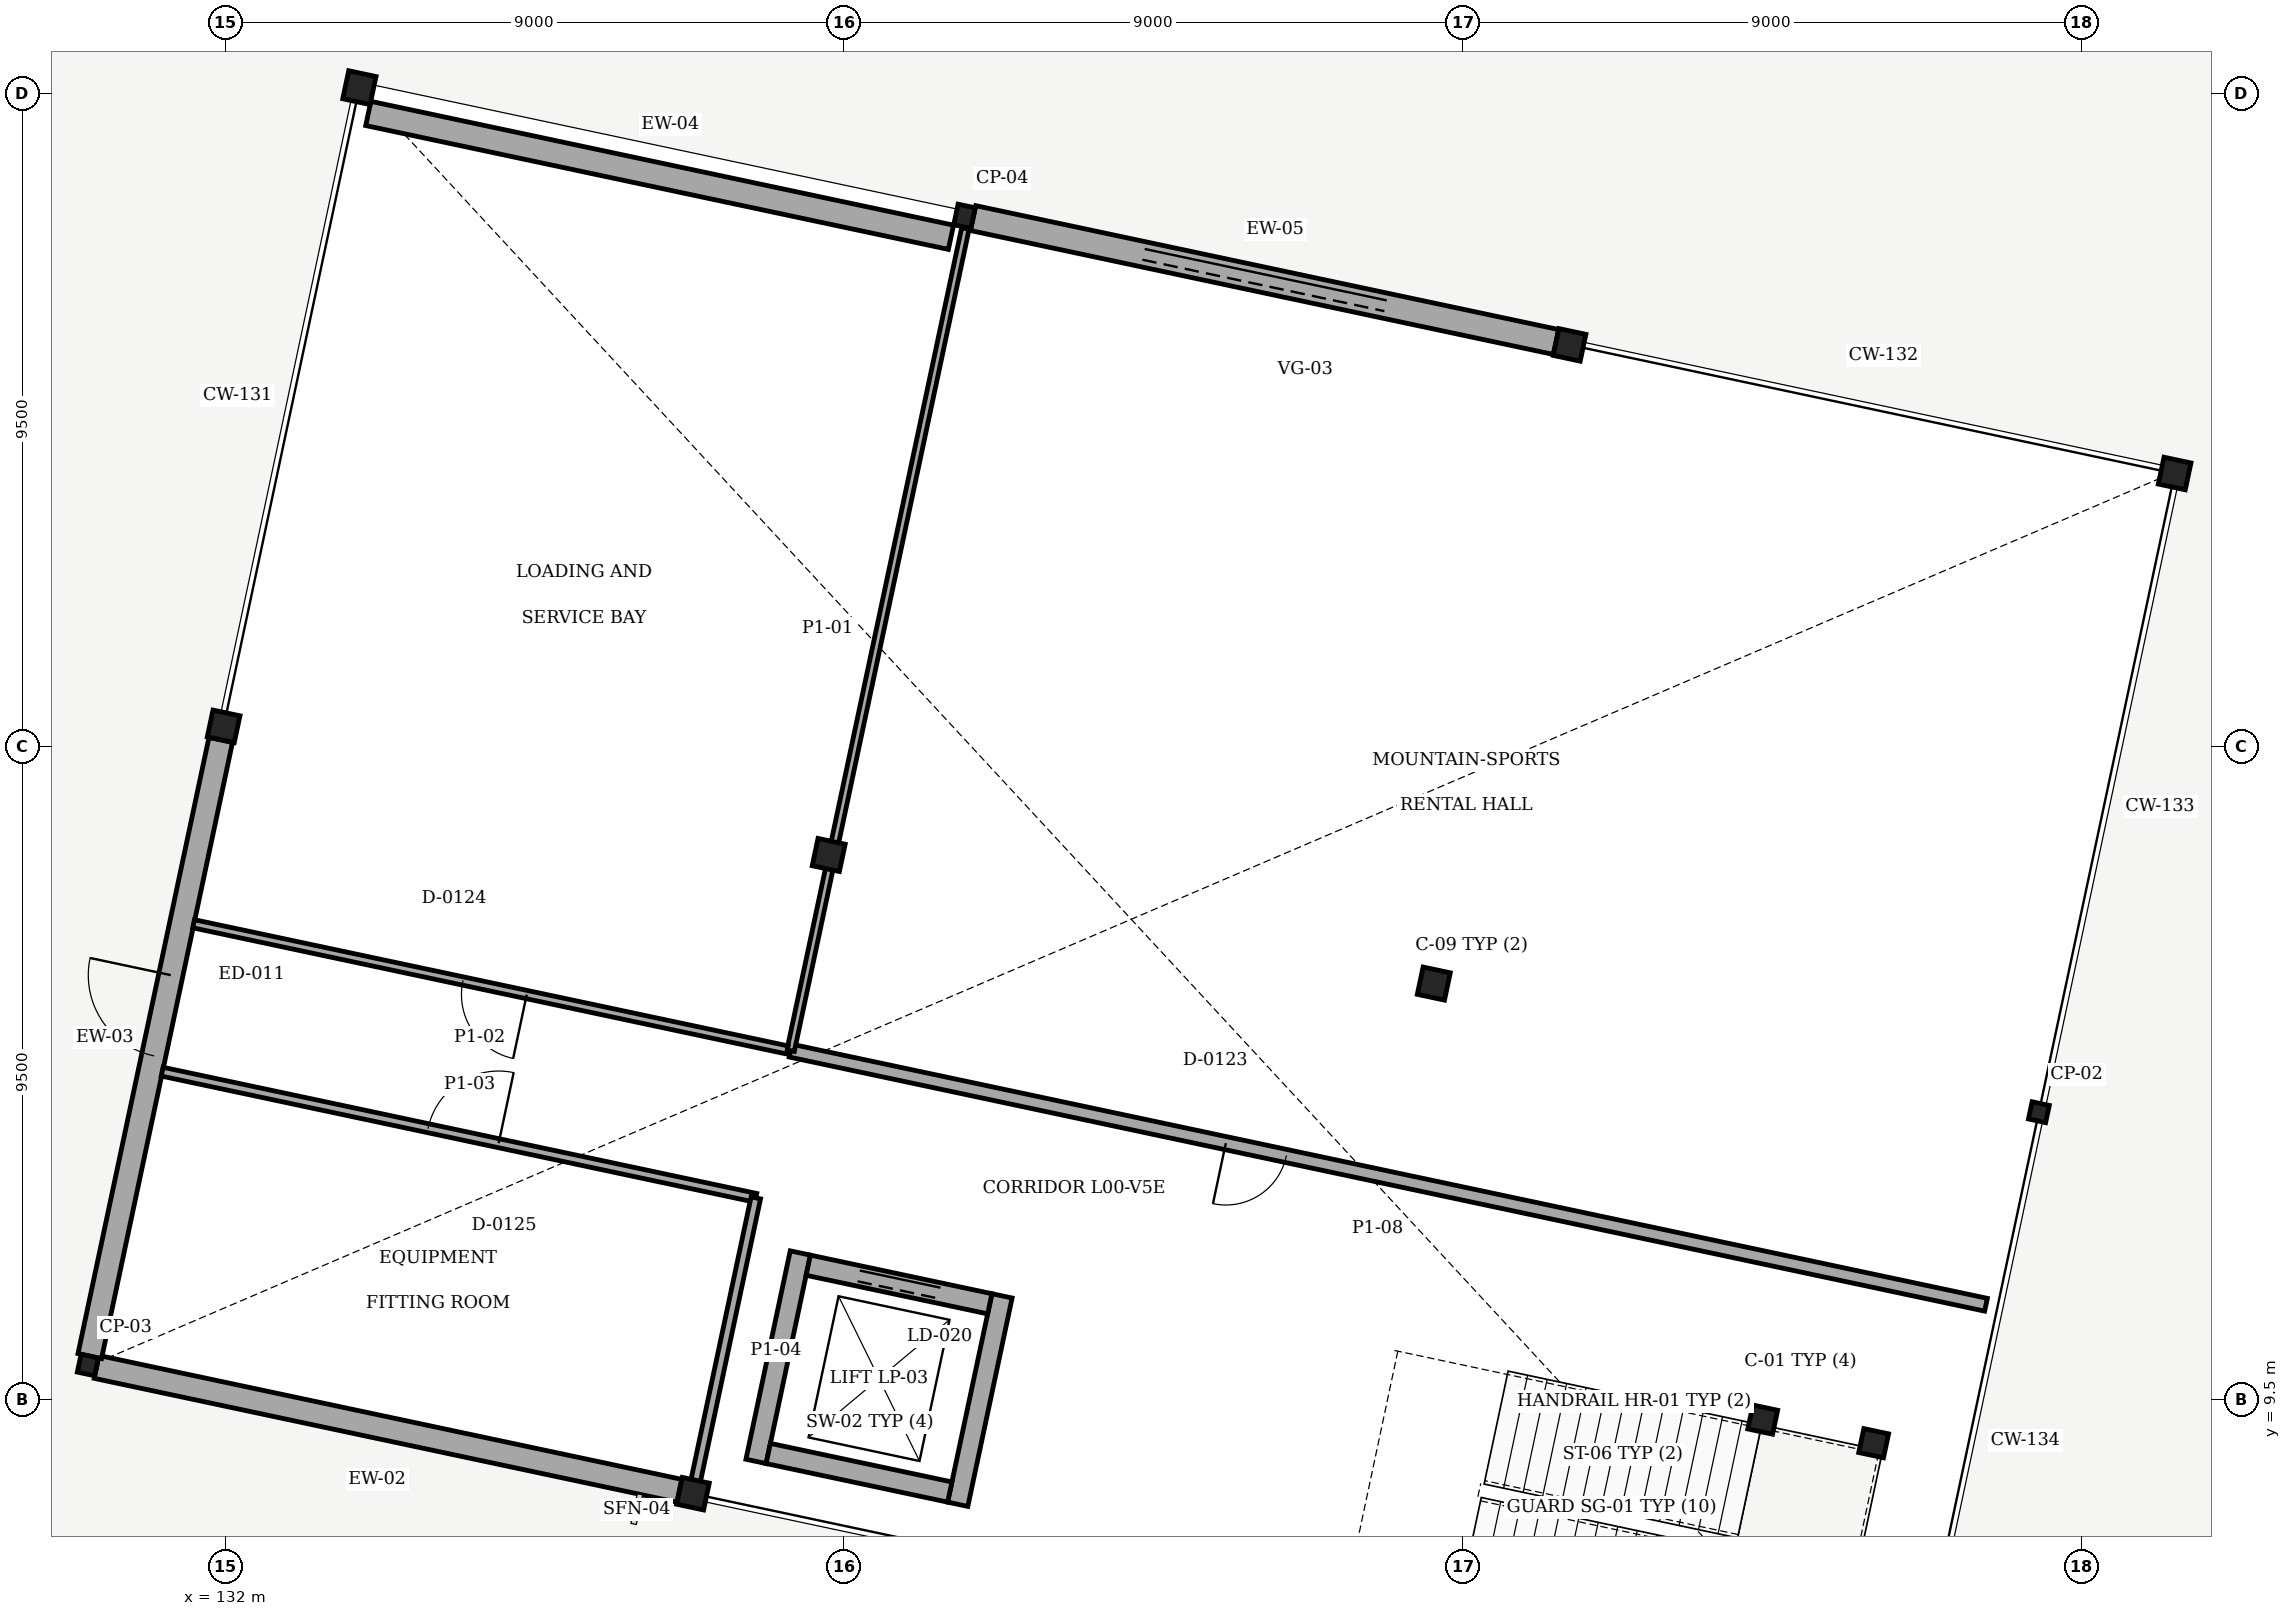
"""IFC4 building model, lengths in metres.
Left out: names, types, materials, properties, quantities, classifications, styles, units other than length and angle.
Written with IfcOpenShell. Run it as: python <this file> out.ifc"""

import sys

from ifc_helpers import new_model, si_unit, direction, frame, frame_2d, origin, origin_with_axes, origin_2d, place, context, subcontext, project, spatial, rectangle, i_section, extrude, element, fill, save


model = new_model("IFC4")
c1 = context("Model", 3, precision=1e-05, world=origin(), true_north=direction((0.0, 1.0)))
c2 = subcontext(c1, "Body", "Model", "MODEL_VIEW")
j1 = project(units=[si_unit("LENGTHUNIT", "METRE"), si_unit("PLANEANGLEUNIT", "RADIAN")], contexts=[c1])
p1 = place(None, origin())
s1 = spatial("IfcSite", under=j1, at=p1, CompositionType="ELEMENT")
p2 = place(p1, origin())
s2 = spatial("IfcBuilding", under=s1, at=p2, CompositionType="ELEMENT")
p3 = place(p2, origin())
s3 = spatial("IfcBuildingStorey", under=s2, at=p3, CompositionType="ELEMENT", Elevation=0.0)
p4 = place(p3, frame((130.0, 10.0, 0.0), z_axis=(0.0, 0.0, 1.0), x_axis=(0.978147600734, -0.207911690818, 0.0)))
e1 = element("IfcColumn", 1, at=p4, inside=s3, PredefinedType="PILASTER", context=c2, shape_type="SweptSolid", body=[
    extrude(i_section(OverallWidth=0.257, OverallDepth=0.264, WebThickness=0.012, FlangeThickness=0.02, FilletRadius=0.009, at=origin_2d()), origin(), (0.0, 0.0, 1.0), 4.8),
])
p5 = place(p3, frame((131.975, 19.292, 0.0), z_axis=(0.0, 0.0, 1.0), x_axis=(0.978147600734, -0.207911690818, 0.0)))
e2 = element("IfcColumn", 2, at=p5, inside=s3, PredefinedType="COLUMN", context=c2, shape_type="SweptSolid", body=[
    extrude(i_section(OverallWidth=0.401, OverallDepth=0.399, WebThickness=0.025, FlangeThickness=0.04, FilletRadius=0.015, at=origin_2d()), origin(), (0.0, 0.0, 1.0), 4.8),
])
p6 = place(p3, frame((133.95, 28.585, 0.0), z_axis=(0.0, 0.0, 1.0), x_axis=(0.978147600734, -0.207911690818, 0.0)))
e3 = element("IfcColumn", 3, at=p6, inside=s3, PredefinedType="COLUMN", context=c2, shape_type="SweptSolid", body=[
    extrude(i_section(OverallWidth=0.406, OverallDepth=0.417, WebThickness=0.03, FlangeThickness=0.048, FilletRadius=0.015, at=origin_2d()), origin(), (0.0, 0.0, 1.0), 4.8),
])
p7 = place(p3, frame((138.803, 8.129, 0.0), z_axis=(0.0, 0.0, 1.0), x_axis=(0.978147600734, -0.207911690818, 0.0)))
e4 = element("IfcColumn", 4, at=p7, inside=s3, PredefinedType="COLUMN", context=c2, shape_type="SweptSolid", body=[
    extrude(i_section(OverallWidth=0.401, OverallDepth=0.399, WebThickness=0.025, FlangeThickness=0.04, FilletRadius=0.015, at=origin_2d()), origin(), (0.0, 0.0, 1.0), 4.8),
])
p8 = place(p3, frame((140.779, 17.421, 0.0), z_axis=(0.0, 0.0, 1.0), x_axis=(0.978147600734, -0.207911690818, 0.0)))
e5 = element("IfcColumn", 5, at=p8, inside=s3, PredefinedType="COLUMN", context=c2, shape_type="SweptSolid", body=[
    extrude(i_section(OverallWidth=0.404, OverallDepth=0.406, WebThickness=0.027, FlangeThickness=0.044, FilletRadius=0.015, at=origin_2d()), origin(), (0.0, 0.0, 1.0), 4.8),
])
p9 = place(p3, frame((142.754, 26.714, 0.0), z_axis=(0.0, 0.0, 1.0), x_axis=(0.978147600734, -0.207911690818, 0.0)))
e6 = element("IfcColumn", 6, at=p9, inside=s3, PredefinedType="PILASTER", context=c2, shape_type="SweptSolid", body=[
    extrude(i_section(OverallWidth=0.254, OverallDepth=0.306, WebThickness=0.009, FlangeThickness=0.015, FilletRadius=0.011, at=origin_2d()), origin(), (0.0, 0.0, 1.0), 4.8),
])
p10 = place(p3, frame((149.582, 15.55, 0.0), z_axis=(0.0, 0.0, 1.0), x_axis=(0.978147600734, -0.207911690818, 0.0)))
e7 = element("IfcColumn", 7, at=p10, inside=s3, PredefinedType="COLUMN", context=c2, shape_type="SweptSolid", body=[
    extrude(i_section(OverallWidth=0.404, OverallDepth=0.406, WebThickness=0.027, FlangeThickness=0.044, FilletRadius=0.015, at=origin_2d()), origin(), (0.0, 0.0, 1.0), 4.8),
])
p11 = place(p3, frame((151.557, 24.842, 0.0), z_axis=(0.0, 0.0, 1.0), x_axis=(0.978147600734, -0.207911690818, 0.0)))
e8 = element("IfcColumn", 8, at=p11, inside=s3, PredefinedType="COLUMN", context=c2, shape_type="SweptSolid", body=[
    extrude(i_section(OverallWidth=0.401, OverallDepth=0.399, WebThickness=0.025, FlangeThickness=0.04, FilletRadius=0.015, at=origin_2d()), origin(), (0.0, 0.0, 1.0), 4.8),
])
p12 = place(p3, frame((158.385, 13.679, 0.0), z_axis=(0.0, 0.0, 1.0), x_axis=(0.978147600734, -0.207911690818, 0.0)))
e9 = element("IfcColumn", 9, at=p12, inside=s3, PredefinedType="PILASTER", context=c2, shape_type="SweptSolid", body=[
    extrude(i_section(OverallWidth=0.255, OverallDepth=0.256, WebThickness=0.01, FlangeThickness=0.016, FilletRadius=0.009, at=origin_2d()), origin(), (0.0, 0.0, 1.0), 4.8),
])
p13 = place(p3, frame((160.36, 22.971, 0.0), z_axis=(0.0, 0.0, 1.0), x_axis=(0.978147600734, -0.207911690818, 0.0)))
e10 = element("IfcColumn", 10, at=p13, inside=s3, PredefinedType="COLUMN", context=c2, shape_type="SweptSolid", body=[
    extrude(i_section(OverallWidth=0.401, OverallDepth=0.399, WebThickness=0.025, FlangeThickness=0.04, FilletRadius=0.015, at=origin_2d()), origin(), (0.0, 0.0, 1.0), 4.8),
])
p14 = place(p3, frame((138.605, 8.171, 0.0), z_axis=(0.0, 0.0, 1.0), x_axis=(-0.978146535451, 0.207916702516, 0.0)))
e11 = element("IfcWall", 11, at=p14, inside=s3, PredefinedType="SOLIDWALL", context=c2, shape_type="SweptSolid", body=[
    extrude(rectangle(XDim=8.667, YDim=0.34, at=frame_2d((4.333, 0.0))), origin(), (0.0, 0.0, 1.0), 3.4),
])
p15 = place(p3, frame((130.028, 10.131, 0.0), z_axis=(0.0, 0.0, 1.0), x_axis=(0.207925982851, 0.978144562759, 0.0)))
e12 = element("IfcWall", 12, at=p15, inside=s3, PredefinedType="SOLIDWALL", context=c2, shape_type="SweptSolid", body=[
    extrude(rectangle(XDim=9.164, YDim=0.35, at=frame_2d((4.582, 0.0))), origin(), (0.0, 0.0, 1.0), 3.4),
])
p16 = place(p15, frame((4.466, 0.0, 0.0)))
e13 = element("IfcOpeningElement", 13, at=p16, cuts=e12, PredefinedType="OPENING", context=c2, shape_type="SweptSolid", body=[
    extrude(rectangle(XDim=1.2, YDim=2.2, at=frame_2d((0.6, 1.1))), frame((0.0, 0.185, 0.0), z_axis=(0.0, -1.0, 0.0), x_axis=(1.0, 0.0, 0.0)), (0.0, 0.0, 1.0), 0.37),
])
p17 = place(p3, frame((134.08, 28.21, 0.0), z_axis=(0.0, 0.0, 1.0), x_axis=(0.97814861123, -0.207906936749, 0.0)))
e14 = element("IfcWall", 14, at=p17, inside=s3, PredefinedType="SOLIDWALL", context=c2, shape_type="SweptSolid", body=[
    extrude(rectangle(XDim=8.666, YDim=0.36, at=frame_2d((4.333, 0.0))), origin(), (0.0, 0.0, 1.0), 3.4),
])
p18 = place(p3, frame((142.88, 26.687, 0.0), z_axis=(0.0, 0.0, 1.0), x_axis=(0.978148112715, -0.207909282121, 0.0)))
e15 = element("IfcWall", 15, at=p18, inside=s3, PredefinedType="SOLIDWALL", context=c2, shape_type="SweptSolid", body=[
    extrude(rectangle(XDim=8.668, YDim=0.37, at=frame_2d((4.334, 0.0))), origin(), (0.0, 0.0, 1.0), 3.4),
])
p19 = place(p18, frame((2.534, 0.0, 0.0)))
e16 = element("IfcOpeningElement", 16, at=p19, cuts=e15, PredefinedType="OPENING", context=c2, shape_type="SweptSolid", body=[
    extrude(rectangle(XDim=3.6, YDim=3.05, at=frame_2d((1.8, 1.525))), frame((0.0, 0.195, 0.0), z_axis=(0.0, -1.0, 0.0), x_axis=(1.0, 0.0, 0.0)), (0.0, 0.0, 1.0), 0.39),
])
for number, where, z_axis, x_axis in (
    (17, (154.367, 9.206, 0.0), (0.0, 0.0, 1.0), (0.978, -0.208, 0.0)),
    (18, (155.981, 8.863, 0.0), (0.0, 0.0, 1.0), (0.978, -0.208, 0.0)),
):
    element("IfcColumn", number, at=place(p3, frame(where, z_axis=z_axis, x_axis=x_axis)), inside=s3, PredefinedType="COLUMN", context=c2, shape_type="SweptSolid", body=[
        extrude(i_section(OverallWidth=0.368, OverallDepth=0.356, WebThickness=0.011, FlangeThickness=0.018, FilletRadius=0.015, at=origin_2d()), origin(), (0.0, 0.0, 1.0), 2.2),
    ])
p20 = place(p3, frame((139.721, 8.598, 0.0), z_axis=(0.0, 0.0, 1.0), x_axis=(0.207899254824, 0.978150244003, 0.0)))
e19 = element("IfcWall", 19, at=p20, inside=s3, PredefinedType="SHEAR", context=c2, shape_type="SweptSolid", body=[
    extrude(rectangle(XDim=3.1, YDim=0.3, at=frame_2d((1.55, 0.0))), origin(), (0.0, 0.0, 1.0), 4.54),
])
p21 = place(p3, frame((142.656, 7.975, 0.0), z_axis=(0.0, 0.0, 1.0), x_axis=(0.207915270313, 0.978146839882, 0.0)))
e20 = element("IfcWall", 20, at=p21, inside=s3, PredefinedType="SHEAR", context=c2, shape_type="SweptSolid", body=[
    extrude(rectangle(XDim=3.1, YDim=0.3, at=frame_2d((1.55, 0.0))), origin(), (0.0, 0.0, 1.0), 4.54),
])
p22 = place(p3, frame((139.899, 8.714, 0.0), z_axis=(0.0, 0.0, 1.0), x_axis=(0.978133334052, -0.207978798957, 0.0)))
e21 = element("IfcWall", 21, at=p22, inside=s3, PredefinedType="SHEAR", context=c2, shape_type="SweptSolid", body=[
    extrude(rectangle(XDim=2.7, YDim=0.3, at=frame_2d((1.35, 0.0))), origin(), (0.0, 0.0, 1.0), 4.54),
])
p23 = place(p3, frame((140.481, 11.453, 0.0), z_axis=(0.0, 0.0, 1.0), x_axis=(0.97815563361, -0.207873895514, 0.0)))
e22 = element("IfcWall", 22, at=p23, inside=s3, PredefinedType="SHEAR", context=c2, shape_type="SweptSolid", body=[
    extrude(rectangle(XDim=2.7, YDim=0.3, at=frame_2d((1.35, 0.0))), origin(), (0.0, 0.0, 1.0), 4.54),
])
p24 = place(p23, frame((0.75, 0.0, 0.0)))
e23 = element("IfcOpeningElement", 23, at=p24, cuts=e22, PredefinedType="OPENING", context=c2, shape_type="SweptSolid", body=[
    extrude(rectangle(XDim=1.2, YDim=2.15, at=frame_2d((0.6, 1.075))), frame((0.0, 0.16, 0.0), z_axis=(0.0, -1.0, 0.0), x_axis=(1.0, 0.0, 0.0)), (0.0, 0.0, 1.0), 0.32),
])
p25 = place(p3, frame((157.616, 10.877, 0.0), z_axis=(0.0, 0.0, 1.0), x_axis=(-0.978146704978, 0.207915904975, 0.0)))
e24 = element("IfcWall", 24, at=p25, inside=s3, PredefinedType="PARTITIONING", context=c2, shape_type="SweptSolid", body=[
    extrude(rectangle(XDim=17.78, YDim=0.19, at=frame_2d((8.89, 0.0))), origin(), (0.0, 0.0, 1.0), 3.38),
])
p26 = place(p25, frame((10.407, 0.0, 0.0)))
e25 = element("IfcOpeningElement", 25, at=p26, cuts=e24, PredefinedType="OPENING", context=c2, shape_type="SweptSolid", body=[
    extrude(rectangle(XDim=0.9, YDim=2.1, at=frame_2d((0.45, 1.05))), frame((0.0, 0.105, 0.0), z_axis=(0.0, -1.0, 0.0), x_axis=(1.0, 0.0, 0.0)), (0.0, 0.0, 1.0), 0.21),
])
p27 = place(p3, frame((140.224, 14.574, 0.0), z_axis=(0.0, 0.0, 1.0), x_axis=(0.207929664169, 0.978143780207, 0.0)))
e26 = element("IfcWall", 26, at=p27, inside=s3, PredefinedType="PARTITIONING", context=c2, shape_type="SweptSolid", body=[
    extrude(rectangle(XDim=12.23, YDim=0.11, at=frame_2d((6.115, 0.0))), origin(), (0.0, 0.0, 1.0), 3.38),
])
p28 = place(p3, frame((140.176, 14.584, 0.0), z_axis=(0.0, 0.0, 1.0), x_axis=(-0.978145427303, 0.207921915745, 0.0)))
e27 = element("IfcWall", 27, at=p28, inside=s3, PredefinedType="PARTITIONING", context=c2, shape_type="SweptSolid", body=[
    extrude(rectangle(XDim=8.83, YDim=0.12, at=frame_2d((4.415, 0.0))), origin(), (0.0, 0.0, 1.0), 3.38),
])
p29 = place(p28, frame((3.875, 0.0, 0.0)))
e28 = element("IfcOpeningElement", 28, at=p29, cuts=e27, PredefinedType="OPENING", context=c2, shape_type="SweptSolid", body=[
    extrude(rectangle(XDim=0.95, YDim=2.15, at=frame_2d((0.475, 1.075))), frame((0.0, 0.07, 0.0), z_axis=(0.0, -1.0, 0.0), x_axis=(1.0, 0.0, 0.0)), (0.0, 0.0, 1.0), 0.14),
])
p30 = place(p3, frame((131.081, 14.269, 0.0), z_axis=(0.0, 0.0, 1.0), x_axis=(0.978146622571, -0.20791629266, 0.0)))
e29 = element("IfcWall", 29, at=p30, inside=s3, PredefinedType="PARTITIONING", context=c2, shape_type="SweptSolid", body=[
    extrude(rectangle(XDim=8.83, YDim=0.13, at=frame_2d((4.415, 0.0))), origin(), (0.0, 0.0, 1.0), 3.38),
])
p31 = place(p30, frame((3.955, 0.0, 0.0)))
e30 = element("IfcOpeningElement", 30, at=p31, cuts=e29, PredefinedType="OPENING", context=c2, shape_type="SweptSolid", body=[
    extrude(rectangle(XDim=1.05, YDim=2.2, at=frame_2d((0.525, 1.1))), frame((0.0, 0.075, 0.0), z_axis=(0.0, -1.0, 0.0), x_axis=(1.0, 0.0, 0.0)), (0.0, 0.0, 1.0), 0.15),
])
p32 = place(p3, frame((139.718, 12.433, 0.0), z_axis=(0.0, 0.0, 1.0), x_axis=(-0.207956086708, -0.978138163043, 0.0)))
e31 = element("IfcWall", 31, at=p32, inside=s3, PredefinedType="PARTITIONING", context=c2, shape_type="SweptSolid", body=[
    extrude(rectangle(XDim=4.23, YDim=0.14, at=frame_2d((2.115, 0.0))), origin(), (0.0, 0.0, 1.0), 3.38),
])
p33 = place(p16, origin_with_axes())
e32 = element("IfcDoor", 32, at=p33, inside=s3, OperationType="SINGLE_SWING_RIGHT", PredefinedType="DOOR", context=c2, shape_type="SweptSolid", body=[
    extrude(rectangle(XDim=1.2, YDim=2.2, at=frame_2d((0.6, 1.1))), frame((0.0, 0.025, 0.0), z_axis=(0.0, -1.0, 0.0), x_axis=(1.0, 0.0, 0.0)), (0.0, 0.0, 1.0), 0.05),
])
fill(e13, e32)
p34 = place(p19, origin_with_axes())
e33 = element("IfcDoor", 33, at=p34, inside=s3, OperationType="ROLLINGUP", PredefinedType="GATE", context=c2, shape_type="SweptSolid", body=[
    extrude(rectangle(XDim=3.6, YDim=3.05, at=frame_2d((1.8, 1.525))), frame((0.0, 0.025, 0.0), z_axis=(0.0, -1.0, 0.0), x_axis=(1.0, 0.0, 0.0)), (0.0, 0.0, 1.0), 0.05),
])
fill(e16, e33)
p35 = place(p24, origin_with_axes())
e34 = element("IfcDoor", 34, at=p35, inside=s3, OperationType="DOUBLE_DOOR_SLIDING", PredefinedType="DOOR", context=c2, shape_type="SweptSolid", body=[
    extrude(rectangle(XDim=1.2, YDim=2.15, at=frame_2d((0.6, 1.075))), frame((0.0, 0.025, 0.0), z_axis=(0.0, -1.0, 0.0), x_axis=(1.0, 0.0, 0.0)), (0.0, 0.0, 1.0), 0.05),
])
fill(e23, e34)
p36 = place(p26, origin_with_axes())
e35 = element("IfcDoor", 35, at=p36, inside=s3, OperationType="SINGLE_SWING_RIGHT", PredefinedType="DOOR", context=c2, shape_type="SweptSolid", body=[
    extrude(rectangle(XDim=0.9, YDim=2.1, at=frame_2d((0.45, 1.05))), frame((0.0, 0.025, 0.0), z_axis=(0.0, -1.0, 0.0), x_axis=(1.0, 0.0, 0.0)), (0.0, 0.0, 1.0), 0.05),
])
fill(e25, e35)
p37 = place(p29, origin_with_axes())
e36 = element("IfcDoor", 36, at=p37, inside=s3, OperationType="SINGLE_SWING_LEFT", PredefinedType="DOOR", context=c2, shape_type="SweptSolid", body=[
    extrude(rectangle(XDim=0.95, YDim=2.15, at=frame_2d((0.475, 1.075))), frame((0.0, 0.025, 0.0), z_axis=(0.0, -1.0, 0.0), x_axis=(1.0, 0.0, 0.0)), (0.0, 0.0, 1.0), 0.05),
])
fill(e28, e36)
p38 = place(p31, origin_with_axes())
e37 = element("IfcDoor", 37, at=p38, inside=s3, OperationType="SINGLE_SWING_RIGHT", PredefinedType="DOOR", context=c2, shape_type="SweptSolid", body=[
    extrude(rectangle(XDim=1.05, YDim=2.2, at=frame_2d((0.525, 1.1))), frame((0.0, 0.025, 0.0), z_axis=(0.0, -1.0, 0.0), x_axis=(1.0, 0.0, 0.0)), (0.0, 0.0, 1.0), 0.05),
])
fill(e30, e37)
save(model, sys.argv[1])
